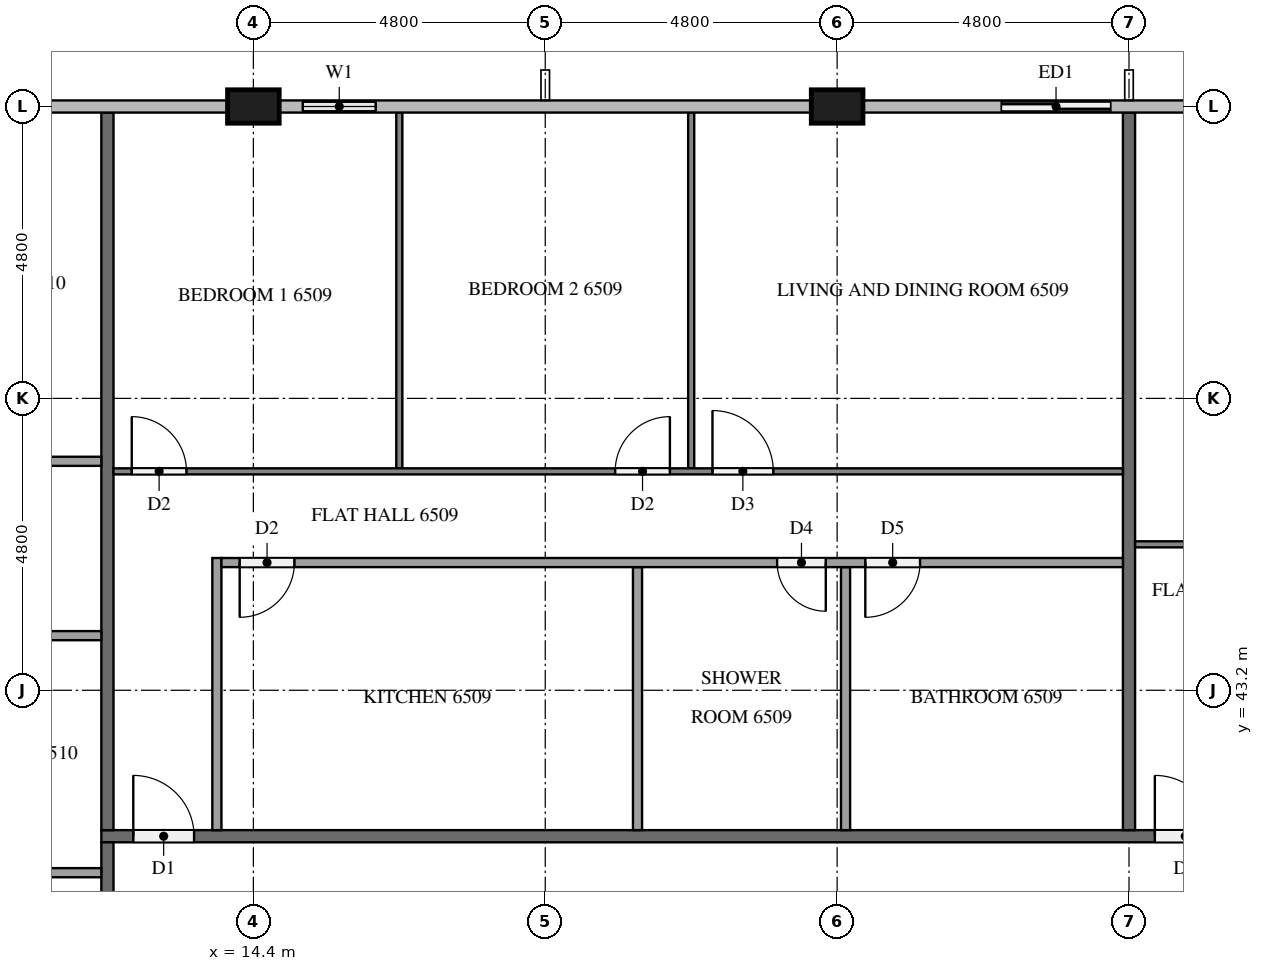
"""IFC4 building model, lengths in metres.
Left out: names, types, materials, properties, quantities, classifications, styles, units other than length and angle.
Written with IfcOpenShell. Run it as: python <this file> out.ifc"""

import sys

from ifc_helpers import new_model, si_unit, direction, frame, frame_2d, origin, origin_2d, place, context, subcontext, project, spatial, rectangle, extrude, element, fill, save


model = new_model("IFC4")
c1 = context("Model", 3, precision=1e-05, world=origin(), true_north=direction((0.0, 1.0)))
c2 = subcontext(c1, "Body", "Model", "MODEL_VIEW")
j1 = project(units=[si_unit("LENGTHUNIT", "METRE"), si_unit("PLANEANGLEUNIT", "RADIAN")], contexts=[c1])
p1 = place(None, origin())
s1 = spatial("IfcSite", under=j1, at=p1, CompositionType="ELEMENT")
p2 = place(p1, origin())
s2 = spatial("IfcBuilding", under=s1, at=p2, CompositionType="ELEMENT")
p3 = place(p2, frame((0.0, 0.0, 249.2)))
s3 = spatial("IfcBuildingStorey", under=s2, at=p3, CompositionType="ELEMENT", Elevation=249.2)
for number, where, z_axis, x_axis in (
    (1, (24.0, 52.8, 0.0), (0.0, 0.0, 1.0), (1.0, 0.0, 0.0)),
    (2, (14.4, 52.8, 0.0), (0.0, 0.0, 1.0), (1.0, 0.0, 0.0)),
):
    element("IfcColumn", number, at=place(p3, frame(where, z_axis=z_axis, x_axis=x_axis)), inside=s3, PredefinedType="COLUMN", context=c2, shape_type="SweptSolid", body=[
        extrude(rectangle(XDim=0.85, YDim=0.55, at=origin_2d()), origin(), (0.0, 0.0, 1.0), 3.2),
    ])
p4 = place(p3, frame((28.8, 52.8, 0.0), z_axis=(0.0, 0.0, 1.0), x_axis=(-1.0, 0.0, 0.0)))
e3 = element("IfcWall", 3, at=p4, inside=s3, PredefinedType="SOLIDWALL", context=c2, shape_type="SweptSolid", body=[
    extrude(rectangle(XDim=2.4, YDim=0.15, at=frame_2d((1.2, 0.0))), origin(), (0.0, 0.0, 1.0), 3.2),
])
p5 = place(p4, frame((0.3, 0.0, 0.0)))
e4 = element("IfcOpeningElement", 4, at=p5, cuts=e3, PredefinedType="OPENING", context=c2, shape_type="SweptSolid", body=[
    extrude(rectangle(XDim=1.8, YDim=2.4, at=frame_2d((0.9, 1.2))), frame((0.0, 0.085, 0.0), z_axis=(0.0, -1.0, 0.0), x_axis=(1.0, 0.0, 0.0)), (0.0, 0.0, 1.0), 0.17),
])
p6 = place(p3, frame((16.8, 52.8, 0.0), z_axis=(0.0, 0.0, 1.0), x_axis=(-1.0, 0.0, 0.0)))
e5 = element("IfcWall", 5, at=p6, inside=s3, PredefinedType="SOLIDWALL", context=c2, shape_type="SweptSolid", body=[
    extrude(rectangle(XDim=1.975, YDim=0.15, at=frame_2d((0.988, 0.0))), origin(), (0.0, 0.0, 1.0), 3.2),
])
p7 = place(p6, frame((0.387, 0.0, 0.9)))
e6 = element("IfcOpeningElement", 6, at=p7, cuts=e5, PredefinedType="OPENING", context=c2, shape_type="SweptSolid", body=[
    extrude(rectangle(XDim=1.2, YDim=1.4, at=frame_2d((0.6, 0.7))), frame((0.0, 0.085, 0.0), z_axis=(0.0, -1.0, 0.0), x_axis=(1.0, 0.0, 0.0)), (0.0, 0.0, 1.0), 0.17),
])
p8 = place(p3, frame((11.9, 40.8, 0.0), z_axis=(0.0, 0.0, 1.0), x_axis=(1.0, 0.0, 0.0)))
e7 = element("IfcWall", 7, at=p8, inside=s3, PredefinedType="PARTITIONING", context=c2, shape_type="SweptSolid", body=[
    extrude(rectangle(XDim=38.6, YDim=0.2, at=frame_2d((19.3, 0.0))), origin(), (0.0, 0.0, 1.0), 3.2),
])
p9 = place(p8, frame((31.725, 0.0, 0.0)))
e8 = element("IfcOpeningElement", 8, at=p9, cuts=e7, PredefinedType="OPENING", context=c2, shape_type="SweptSolid", body=[
    extrude(rectangle(XDim=1.0, YDim=2.1, at=frame_2d((0.5, 1.05))), frame((0.0, 0.11, 0.0), z_axis=(0.0, -1.0, 0.0), x_axis=(1.0, 0.0, 0.0)), (0.0, 0.0, 1.0), 0.22),
])
p10 = place(p8, frame((17.325, 0.0, 0.0)))
e9 = element("IfcOpeningElement", 9, at=p10, cuts=e7, PredefinedType="OPENING", context=c2, shape_type="SweptSolid", body=[
    extrude(rectangle(XDim=1.0, YDim=2.1, at=frame_2d((0.5, 1.05))), frame((0.0, 0.11, 0.0), z_axis=(0.0, -1.0, 0.0), x_axis=(1.0, 0.0, 0.0)), (0.0, 0.0, 1.0), 0.22),
])
p11 = place(p8, frame((0.525, 0.0, 0.0)))
e10 = element("IfcOpeningElement", 10, at=p11, cuts=e7, PredefinedType="OPENING", context=c2, shape_type="SweptSolid", body=[
    extrude(rectangle(XDim=1.0, YDim=2.1, at=frame_2d((0.5, 1.05))), frame((0.0, 0.11, 0.0), z_axis=(0.0, -1.0, 0.0), x_axis=(1.0, 0.0, 0.0)), (0.0, 0.0, 1.0), 0.22),
])
p12 = place(p3, frame((12.0, 12.1, 0.0), z_axis=(0.0, 0.0, 1.0), x_axis=(0.0, 1.0, 0.0)))
e11 = element("IfcWall", 11, at=p12, inside=s3, PredefinedType="PARTITIONING", context=c2, shape_type="SweptSolid", body=[
    extrude(rectangle(XDim=28.6, YDim=0.2, at=frame_2d((14.3, 0.0))), origin(), (0.0, 0.0, 1.0), 3.2),
])
p13 = place(p12, frame((26.725, 0.0, 0.0)))
e12 = element("IfcOpeningElement", 12, at=p13, cuts=e11, PredefinedType="OPENING", context=c2, shape_type="SweptSolid", body=[
    extrude(rectangle(XDim=1.0, YDim=2.1, at=frame_2d((0.5, 1.05))), frame((0.0, 0.11, 0.0), z_axis=(0.0, -1.0, 0.0), x_axis=(1.0, 0.0, 0.0)), (0.0, 0.0, 1.0), 0.22),
])
p14 = place(p12, frame((24.875, 0.0, 0.0)))
e13 = element("IfcOpeningElement", 13, at=p14, cuts=e11, PredefinedType="OPENING", context=c2, shape_type="SweptSolid", body=[
    extrude(rectangle(XDim=1.0, YDim=2.1, at=frame_2d((0.5, 1.05))), frame((0.0, 0.11, 0.0), z_axis=(0.0, -1.0, 0.0), x_axis=(1.0, 0.0, 0.0)), (0.0, 0.0, 1.0), 0.22),
])
p15 = place(p12, frame((17.675, 0.0, 0.0)))
e14 = element("IfcOpeningElement", 14, at=p15, cuts=e11, PredefinedType="OPENING", context=c2, shape_type="SweptSolid", body=[
    extrude(rectangle(XDim=1.0, YDim=2.1, at=frame_2d((0.5, 1.05))), frame((0.0, 0.11, 0.0), z_axis=(0.0, -1.0, 0.0), x_axis=(1.0, 0.0, 0.0)), (0.0, 0.0, 1.0), 0.22),
])
p16 = place(p12, frame((2.725, 0.0, 0.0)))
e15 = element("IfcOpeningElement", 15, at=p16, cuts=e11, PredefinedType="OPENING", context=c2, shape_type="SweptSolid", body=[
    extrude(rectangle(XDim=1.0, YDim=2.1, at=frame_2d((0.5, 1.05))), frame((0.0, 0.11, 0.0), z_axis=(0.0, -1.0, 0.0), x_axis=(1.0, 0.0, 0.0)), (0.0, 0.0, 1.0), 0.22),
])
p17 = place(p12, frame((0.875, 0.0, 0.0)))
e16 = element("IfcOpeningElement", 16, at=p17, cuts=e11, PredefinedType="OPENING", context=c2, shape_type="SweptSolid", body=[
    extrude(rectangle(XDim=1.0, YDim=2.1, at=frame_2d((0.5, 1.05))), frame((0.0, 0.11, 0.0), z_axis=(0.0, -1.0, 0.0), x_axis=(1.0, 0.0, 0.0)), (0.0, 0.0, 1.0), 0.22),
])
for number, where, z_axis, x_axis in (
    (17, (28.8, 52.7, 0.0), (0.0, 0.0, 1.0), (0.0, -1.0, 0.0)),
    (18, (12.0, 52.7, 0.0), (0.0, 0.0, 1.0), (0.0, -1.0, 0.0)),
):
    element("IfcWall", number, at=place(p3, frame(where, z_axis=z_axis, x_axis=x_axis)), inside=s3, PredefinedType="PARTITIONING", context=c2, shape_type="SweptSolid", body=[
        extrude(rectangle(XDim=11.8, YDim=0.2, at=frame_2d((5.9, 0.0))), origin(), (0.0, 0.0, 1.0), 3.2),
    ])
p18 = place(p3, frame((28.9, 45.6, 0.0), z_axis=(0.0, 0.0, 1.0), x_axis=(1.0, 0.0, 0.0)))
e19 = element("IfcWall", 19, at=p18, inside=s3, PredefinedType="PARTITIONING", context=c2, shape_type="SweptSolid", body=[
    extrude(rectangle(XDim=14.2, YDim=0.1, at=frame_2d((7.1, 0.0))), origin(), (0.0, 0.0, 1.0), 3.2),
])
p19 = place(p18, frame((3.35, 0.0, 0.0)))
e20 = element("IfcOpeningElement", 20, at=p19, cuts=e19, PredefinedType="OPENING", context=c2, shape_type="SweptSolid", body=[
    extrude(rectangle(XDim=1.0, YDim=2.1, at=frame_2d((0.5, 1.05))), frame((0.0, 0.06, 0.0), z_axis=(0.0, -1.0, 0.0), x_axis=(1.0, 0.0, 0.0)), (0.0, 0.0, 1.0), 0.12),
])
p20 = place(p18, frame((5.05, 0.0, 0.0)))
e21 = element("IfcOpeningElement", 21, at=p20, cuts=e19, PredefinedType="OPENING", context=c2, shape_type="SweptSolid", body=[
    extrude(rectangle(XDim=0.9, YDim=2.1, at=frame_2d((0.45, 1.05))), frame((0.0, 0.06, 0.0), z_axis=(0.0, -1.0, 0.0), x_axis=(1.0, 0.0, 0.0)), (0.0, 0.0, 1.0), 0.12),
])
p21 = place(p18, frame((13.0, 0.0, 0.0)))
e22 = element("IfcOpeningElement", 22, at=p21, cuts=e19, PredefinedType="OPENING", context=c2, shape_type="SweptSolid", body=[
    extrude(rectangle(XDim=0.9, YDim=2.1, at=frame_2d((0.45, 1.05))), frame((0.0, 0.06, 0.0), z_axis=(0.0, -1.0, 0.0), x_axis=(1.0, 0.0, 0.0)), (0.0, 0.0, 1.0), 0.12),
])
for number, where, z_axis, x_axis in (
    (23, (16.8, 46.85, 0.0), (0.0, 0.0, 1.0), (0.0, 1.0, 0.0)),
    (24, (21.6, 46.85, 0.0), (0.0, 0.0, 1.0), (0.0, 1.0, 0.0)),
):
    element("IfcWall", number, at=place(p3, frame(where, z_axis=z_axis, x_axis=x_axis)), inside=s3, PredefinedType="PARTITIONING", context=c2, shape_type="SweptSolid", body=[
        extrude(rectangle(XDim=5.85, YDim=0.1, at=frame_2d((2.925, 0.0))), origin(), (0.0, 0.0, 1.0), 3.2),
    ])
p22 = place(p3, frame((12.1, 46.8, 0.0), z_axis=(0.0, 0.0, 1.0), x_axis=(1.0, 0.0, 0.0)))
e25 = element("IfcWall", 25, at=p22, inside=s3, PredefinedType="PARTITIONING", context=c2, shape_type="SweptSolid", body=[
    extrude(rectangle(XDim=16.6, YDim=0.1, at=frame_2d((8.3, 0.0))), origin(), (0.0, 0.0, 1.0), 3.2),
])
p23 = place(p22, frame((0.3, 0.0, 0.0)))
e26 = element("IfcOpeningElement", 26, at=p23, cuts=e25, PredefinedType="OPENING", context=c2, shape_type="SweptSolid", body=[
    extrude(rectangle(XDim=0.9, YDim=2.1, at=frame_2d((0.45, 1.05))), frame((0.0, 0.06, 0.0), z_axis=(0.0, -1.0, 0.0), x_axis=(1.0, 0.0, 0.0)), (0.0, 0.0, 1.0), 0.12),
])
p24 = place(p22, frame((8.25, 0.0, 0.0)))
e27 = element("IfcOpeningElement", 27, at=p24, cuts=e25, PredefinedType="OPENING", context=c2, shape_type="SweptSolid", body=[
    extrude(rectangle(XDim=0.9, YDim=2.1, at=frame_2d((0.45, 1.05))), frame((0.0, 0.06, 0.0), z_axis=(0.0, -1.0, 0.0), x_axis=(1.0, 0.0, 0.0)), (0.0, 0.0, 1.0), 0.12),
])
p25 = place(p22, frame((9.85, 0.0, 0.0)))
e28 = element("IfcOpeningElement", 28, at=p25, cuts=e25, PredefinedType="OPENING", context=c2, shape_type="SweptSolid", body=[
    extrude(rectangle(XDim=1.0, YDim=2.1, at=frame_2d((0.5, 1.05))), frame((0.0, 0.06, 0.0), z_axis=(0.0, -1.0, 0.0), x_axis=(1.0, 0.0, 0.0)), (0.0, 0.0, 1.0), 0.12),
])
for number, where, z_axis, x_axis in (
    (29, (20.717, 40.9, 0.0), (0.0, 0.0, 1.0), (0.0, 1.0, 0.0)),
    (30, (24.138, 40.9, 0.0), (0.0, 0.0, 1.0), (0.0, 1.0, 0.0)),
):
    element("IfcWall", number, at=place(p3, frame(where, z_axis=z_axis, x_axis=x_axis)), inside=s3, PredefinedType="PARTITIONING", context=c2, shape_type="SweptSolid", body=[
        extrude(rectangle(XDim=4.325, YDim=0.15, at=frame_2d((2.163, 0.0))), origin(), (0.0, 0.0, 1.0), 3.2),
    ])
p26 = place(p3, frame((13.8, 40.9, 0.0), z_axis=(0.0, 0.0, 1.0), x_axis=(0.0, 1.0, 0.0)))
e31 = element("IfcWall", 31, at=p26, inside=s3, PredefinedType="PARTITIONING", context=c2, shape_type="SweptSolid", body=[
    extrude(rectangle(XDim=4.475, YDim=0.15, at=frame_2d((2.238, 0.0))), origin(), (0.0, 0.0, 1.0), 3.2),
])
p27 = place(p3, frame((28.7, 45.3, 0.0), z_axis=(0.0, 0.0, 1.0), x_axis=(-1.0, 0.0, 0.0)))
e32 = element("IfcWall", 32, at=p27, inside=s3, PredefinedType="PARTITIONING", context=c2, shape_type="SweptSolid", body=[
    extrude(rectangle(XDim=14.825, YDim=0.15, at=frame_2d((7.413, 0.0))), origin(), (0.0, 0.0, 1.0), 3.2),
])
p28 = place(p27, frame((13.625, 0.0, 0.0)))
e33 = element("IfcOpeningElement", 33, at=p28, cuts=e32, PredefinedType="OPENING", context=c2, shape_type="SweptSolid", body=[
    extrude(rectangle(XDim=0.9, YDim=2.1, at=frame_2d((0.45, 1.05))), frame((0.0, 0.085, 0.0), z_axis=(0.0, -1.0, 0.0), x_axis=(1.0, 0.0, 0.0)), (0.0, 0.0, 1.0), 0.17),
])
p29 = place(p27, frame((4.886, 0.0, 0.0)))
e34 = element("IfcOpeningElement", 34, at=p29, cuts=e32, PredefinedType="OPENING", context=c2, shape_type="SweptSolid", body=[
    extrude(rectangle(XDim=0.8, YDim=2.1, at=frame_2d((0.4, 1.05))), frame((0.0, 0.085, 0.0), z_axis=(0.0, -1.0, 0.0), x_axis=(1.0, 0.0, 0.0)), (0.0, 0.0, 1.0), 0.17),
])
p30 = place(p27, frame((3.336, 0.0, 0.0)))
e35 = element("IfcOpeningElement", 35, at=p30, cuts=e32, PredefinedType="OPENING", context=c2, shape_type="SweptSolid", body=[
    extrude(rectangle(XDim=0.9, YDim=2.1, at=frame_2d((0.45, 1.05))), frame((0.0, 0.085, 0.0), z_axis=(0.0, -1.0, 0.0), x_axis=(1.0, 0.0, 0.0)), (0.0, 0.0, 1.0), 0.17),
])
for number, where, z_axis, x_axis in (
    (36, (11.9, 44.098, 0.0), (0.0, 0.0, 1.0), (-1.0, 0.0, 0.0)),
    (37, (11.9, 46.965, 0.0), (0.0, 0.0, 1.0), (-1.0, 0.0, 0.0)),
):
    element("IfcWall", number, at=place(p3, frame(where, z_axis=z_axis, x_axis=x_axis)), inside=s3, PredefinedType="PARTITIONING", context=c2, shape_type="SweptSolid", body=[
        extrude(rectangle(XDim=3.275, YDim=0.15, at=frame_2d((1.637, 0.0))), origin(), (0.0, 0.0, 1.0), 3.2),
    ])
p31 = place(p3, frame((11.9, 40.2, 0.0), z_axis=(0.0, 0.0, 1.0), x_axis=(-1.0, 0.0, 0.0)))
e38 = element("IfcWall", 38, at=p31, inside=s3, PredefinedType="PARTITIONING", context=c2, shape_type="SweptSolid", body=[
    extrude(rectangle(XDim=3.425, YDim=0.15, at=frame_2d((1.712, 0.0))), origin(), (0.0, 0.0, 1.0), 3.2),
])
p32 = place(p5, origin())
e39 = element("IfcDoor", 39, at=p32, inside=s3, OperationType="SLIDING_TO_LEFT", PredefinedType="DOOR", context=c2, shape_type="SweptSolid", body=[
    extrude(rectangle(XDim=1.8, YDim=2.4, at=frame_2d((0.9, 1.2))), frame((0.0, 0.025, 0.0), z_axis=(0.0, -1.0, 0.0), x_axis=(1.0, 0.0, 0.0)), (0.0, 0.0, 1.0), 0.05),
])
fill(e4, e39)
p33 = place(p7, origin())
e40 = element("IfcWindow", 40, at=p33, inside=s3, PartitioningType="SINGLE_PANEL", PredefinedType="WINDOW", context=c2, shape_type="SweptSolid", body=[
    extrude(rectangle(XDim=1.2, YDim=1.4, at=frame_2d((0.6, 0.7))), frame((0.0, 0.03, 0.0), z_axis=(0.0, -1.0, 0.0), x_axis=(1.0, 0.0, 0.0)), (0.0, 0.0, 1.0), 0.06),
])
fill(e6, e40)
p34 = place(p10, origin())
e41 = element("IfcDoor", 41, at=p34, inside=s3, OperationType="SINGLE_SWING_LEFT", PredefinedType="DOOR", context=c2, shape_type="SweptSolid", body=[
    extrude(rectangle(XDim=1.0, YDim=2.1, at=frame_2d((0.5, 1.05))), frame((0.0, 0.025, 0.0), z_axis=(0.0, -1.0, 0.0), x_axis=(1.0, 0.0, 0.0)), (0.0, 0.0, 1.0), 0.05),
])
fill(e9, e41)
p35 = place(p11, origin())
e42 = element("IfcDoor", 42, at=p35, inside=s3, OperationType="SINGLE_SWING_LEFT", PredefinedType="DOOR", context=c2, shape_type="SweptSolid", body=[
    extrude(rectangle(XDim=1.0, YDim=2.1, at=frame_2d((0.5, 1.05))), frame((0.0, 0.025, 0.0), z_axis=(0.0, -1.0, 0.0), x_axis=(1.0, 0.0, 0.0)), (0.0, 0.0, 1.0), 0.05),
])
fill(e10, e42)
p36 = place(p23, origin())
e43 = element("IfcDoor", 43, at=p36, inside=s3, OperationType="SINGLE_SWING_LEFT", PredefinedType="DOOR", context=c2, shape_type="SweptSolid", body=[
    extrude(rectangle(XDim=0.9, YDim=2.1, at=frame_2d((0.45, 1.05))), frame((0.0, 0.025, 0.0), z_axis=(0.0, -1.0, 0.0), x_axis=(1.0, 0.0, 0.0)), (0.0, 0.0, 1.0), 0.05),
])
fill(e26, e43)
p37 = place(p24, origin())
e44 = element("IfcDoor", 44, at=p37, inside=s3, OperationType="SINGLE_SWING_RIGHT", PredefinedType="DOOR", context=c2, shape_type="SweptSolid", body=[
    extrude(rectangle(XDim=0.9, YDim=2.1, at=frame_2d((0.45, 1.05))), frame((0.0, 0.025, 0.0), z_axis=(0.0, -1.0, 0.0), x_axis=(1.0, 0.0, 0.0)), (0.0, 0.0, 1.0), 0.05),
])
fill(e27, e44)
p38 = place(p25, origin())
e45 = element("IfcDoor", 45, at=p38, inside=s3, OperationType="SINGLE_SWING_LEFT", PredefinedType="DOOR", context=c2, shape_type="SweptSolid", body=[
    extrude(rectangle(XDim=1.0, YDim=2.1, at=frame_2d((0.5, 1.05))), frame((0.0, 0.025, 0.0), z_axis=(0.0, -1.0, 0.0), x_axis=(1.0, 0.0, 0.0)), (0.0, 0.0, 1.0), 0.05),
])
fill(e28, e45)
p39 = place(p28, origin())
e46 = element("IfcDoor", 46, at=p39, inside=s3, OperationType="SINGLE_SWING_RIGHT", PredefinedType="DOOR", context=c2, shape_type="SweptSolid", body=[
    extrude(rectangle(XDim=0.9, YDim=2.1, at=frame_2d((0.45, 1.05))), frame((0.0, 0.025, 0.0), z_axis=(0.0, -1.0, 0.0), x_axis=(1.0, 0.0, 0.0)), (0.0, 0.0, 1.0), 0.05),
])
fill(e33, e46)
p40 = place(p29, origin())
e47 = element("IfcDoor", 47, at=p40, inside=s3, OperationType="SINGLE_SWING_LEFT", PredefinedType="DOOR", context=c2, shape_type="SweptSolid", body=[
    extrude(rectangle(XDim=0.8, YDim=2.1, at=frame_2d((0.4, 1.05))), frame((0.0, 0.025, 0.0), z_axis=(0.0, -1.0, 0.0), x_axis=(1.0, 0.0, 0.0)), (0.0, 0.0, 1.0), 0.05),
])
fill(e34, e47)
p41 = place(p30, origin())
e48 = element("IfcDoor", 48, at=p41, inside=s3, OperationType="SINGLE_SWING_RIGHT", PredefinedType="DOOR", context=c2, shape_type="SweptSolid", body=[
    extrude(rectangle(XDim=0.9, YDim=2.1, at=frame_2d((0.45, 1.05))), frame((0.0, 0.025, 0.0), z_axis=(0.0, -1.0, 0.0), x_axis=(1.0, 0.0, 0.0)), (0.0, 0.0, 1.0), 0.05),
])
fill(e35, e48)
save(model, sys.argv[1])
